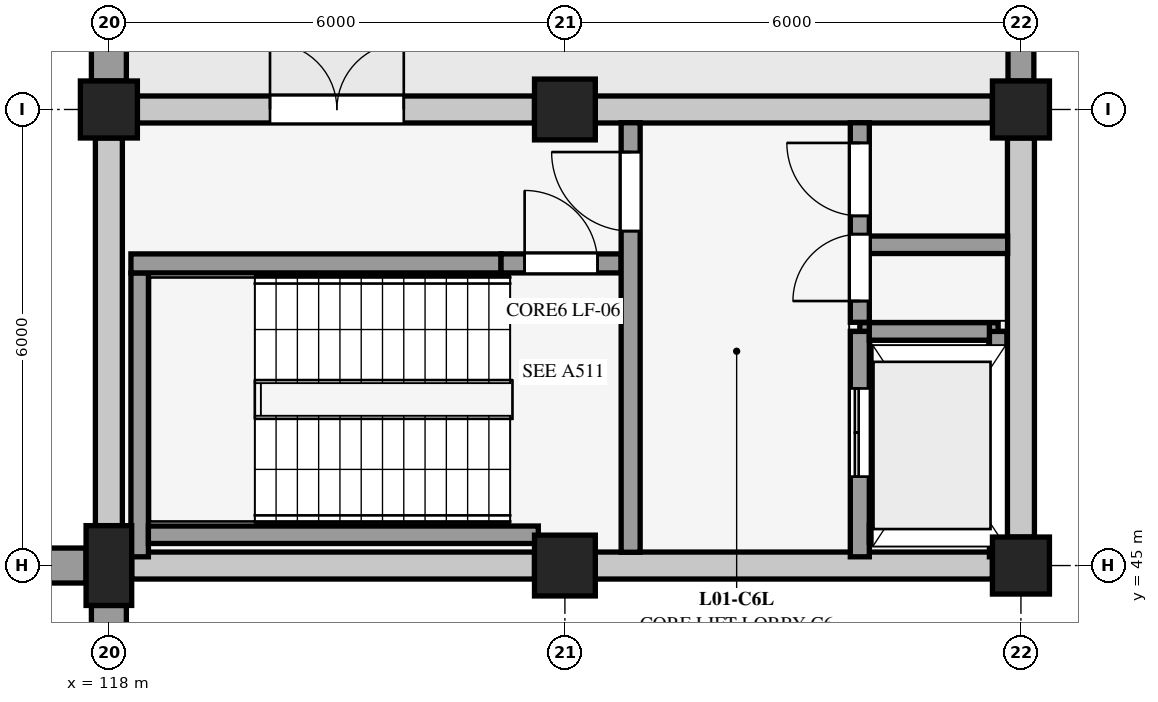
"""IFC4 building model, lengths in metres.
Left out: names, types, materials, properties, quantities, classifications, styles, units other than length and angle.
Written with IfcOpenShell. Run it as: python <this file> out.ifc"""

import sys

from ifc_helpers import new_model, si_unit, direction, frame, frame_2d, origin, origin_2d, place, context, subcontext, project, spatial, rectangle, extrude, element, fill, save


model = new_model("IFC4")
c1 = context("Model", 3, precision=1e-05, world=origin(), true_north=direction((0.0, 1.0)))
c2 = subcontext(c1, "Body", "Model", "MODEL_VIEW")
j1 = project(units=[si_unit("LENGTHUNIT", "METRE"), si_unit("PLANEANGLEUNIT", "RADIAN")], contexts=[c1])
p1 = place(None, origin())
s1 = spatial("IfcSite", under=j1, at=p1, CompositionType="ELEMENT")
p2 = place(p1, origin())
s2 = spatial("IfcBuilding", under=s1, at=p2, CompositionType="ELEMENT")
p3 = place(p2, origin())
s3 = spatial("IfcBuildingStorey", under=s2, at=p3, CompositionType="ELEMENT", Elevation=0.0)
p4 = place(p3, frame((118.0, 45.0, 0.0), z_axis=(0.0, 0.0, 1.0), x_axis=(1.0, 0.0, 0.0)))
e1 = element("IfcColumn", 1, at=p4, inside=s3, PredefinedType="PILASTER", context=c2, shape_type="SweptSolid", body=[
    extrude(rectangle(XDim=0.6, YDim=1.05, at=origin_2d()), origin(), (0.0, 0.0, 1.0), 4.5),
])
p5 = place(p3, frame((118.0, 51.0, 0.0), z_axis=(0.0, 0.0, 1.0), x_axis=(1.0, 0.0, 0.0)))
e2 = element("IfcColumn", 2, at=p5, inside=s3, PredefinedType="COLUMN", context=c2, shape_type="SweptSolid", body=[
    extrude(rectangle(XDim=0.75, YDim=0.75, at=origin_2d()), origin(), (0.0, 0.0, 1.0), 4.5),
])
for number, where, z_axis, x_axis in (
    (3, (124.0, 45.0, 0.0), (0.0, 0.0, 1.0), (1.0, 0.0, 0.0)),
    (4, (124.0, 51.0, 0.0), (0.0, 0.0, 1.0), (1.0, 0.0, 0.0)),
):
    element("IfcColumn", number, at=place(p3, frame(where, z_axis=z_axis, x_axis=x_axis)), inside=s3, PredefinedType="COLUMN", context=c2, shape_type="SweptSolid", body=[
        extrude(rectangle(XDim=0.8, YDim=0.8, at=origin_2d()), origin(), (0.0, 0.0, 1.0), 4.5),
    ])
for number, where, z_axis, x_axis in (
    (5, (130.0, 45.0, 0.0), (0.0, 0.0, 1.0), (1.0, 0.0, 0.0)),
    (6, (130.0, 51.0, 0.0), (0.0, 0.0, 1.0), (1.0, 0.0, 0.0)),
):
    element("IfcColumn", number, at=place(p3, frame(where, z_axis=z_axis, x_axis=x_axis)), inside=s3, PredefinedType="COLUMN", context=c2, shape_type="SweptSolid", body=[
        extrude(rectangle(XDim=0.75, YDim=0.75, at=origin_2d()), origin(), (0.0, 0.0, 1.0), 4.5),
    ])
p6 = place(p3, frame((112.3, 45.0, 0.0), z_axis=(0.0, 0.0, 1.0), x_axis=(1.0, 0.0, 0.0)))
e7 = element("IfcWall", 7, at=p6, inside=s3, PredefinedType="USERDEFINED", context=c2, shape_type="SweptSolid", body=[
    extrude(rectangle(XDim=5.4, YDim=0.46, at=frame_2d((2.7, 0.0))), origin(), (0.0, 0.0, 1.0), 4.5),
])
p7 = place(p3, frame((118.0, 51.375, 0.0), z_axis=(0.0, 0.0, 1.0), x_axis=(0.0, 1.0, 0.0)))
e8 = element("IfcWall", 8, at=p7, inside=s3, PredefinedType="USERDEFINED", context=c2, shape_type="SweptSolid", body=[
    extrude(rectangle(XDim=4.6, YDim=0.46, at=frame_2d((2.3, 0.0))), origin(), (0.0, 0.0, 1.0), 4.5),
])
p8 = place(p3, frame((118.0, 39.4, 0.0), z_axis=(0.0, 0.0, 1.0), x_axis=(0.0, 1.0, 0.0)))
e9 = element("IfcWall", 9, at=p8, inside=s3, PredefinedType="USERDEFINED", context=c2, shape_type="SweptSolid", body=[
    extrude(rectangle(XDim=5.075, YDim=0.46, at=frame_2d((2.538, 0.0))), origin(), (0.0, 0.0, 1.0), 4.5),
])
p9 = place(p3, frame((130.0, 51.375, 0.0), z_axis=(0.0, 0.0, 1.0), x_axis=(0.0, 1.0, 0.0)))
e10 = element("IfcWall", 10, at=p9, inside=s3, PredefinedType="USERDEFINED", context=c2, shape_type="SweptSolid", body=[
    extrude(rectangle(XDim=4.75, YDim=0.34, at=frame_2d((2.375, 0.0))), origin(), (0.0, 0.0, 1.0), 4.5),
])
p10 = place(p3, frame((123.6, 45.0, 0.0), z_axis=(0.0, 0.0, 1.0), x_axis=(-1.0, 0.0, 0.0)))
e11 = element("IfcWall", 11, at=p10, inside=s3, PredefinedType="SOLIDWALL", context=c2, shape_type="SweptSolid", body=[
    extrude(rectangle(XDim=5.3, YDim=0.355, at=frame_2d((2.65, 0.0))), origin(), (0.0, 0.0, 1.0), 3.747),
])
p11 = place(p3, frame((118.375, 51.0, 0.0), z_axis=(0.0, 0.0, 1.0), x_axis=(1.0, 0.0, 0.0)))
e12 = element("IfcWall", 12, at=p11, inside=s3, PredefinedType="SOLIDWALL", context=c2, shape_type="SweptSolid", body=[
    extrude(rectangle(XDim=5.225, YDim=0.355, at=frame_2d((2.613, 0.0))), origin(), (0.0, 0.0, 1.0), 3.881),
])
p12 = place(p11, frame((1.745, 0.0, 0.0)))
e13 = element("IfcOpeningElement", 13, at=p12, cuts=e12, PredefinedType="OPENING", context=c2, shape_type="SweptSolid", body=[
    extrude(rectangle(XDim=1.76, YDim=2.18, at=frame_2d((0.88, 1.09))), frame((0.0, 0.188, 0.0), z_axis=(0.0, -1.0, 0.0), x_axis=(1.0, 0.0, 0.0)), (0.0, 0.0, 1.0), 0.375),
])
p13 = place(p3, frame((129.625, 45.0, 0.0), z_axis=(0.0, 0.0, 1.0), x_axis=(-1.0, 0.0, 0.0)))
e14 = element("IfcWall", 14, at=p13, inside=s3, PredefinedType="SOLIDWALL", context=c2, shape_type="SweptSolid", body=[
    extrude(rectangle(XDim=5.225, YDim=0.355, at=frame_2d((2.613, 0.0))), origin(), (0.0, 0.0, 1.0), 3.671),
])
p14 = place(p3, frame((124.4, 51.0, 0.0), z_axis=(0.0, 0.0, 1.0), x_axis=(1.0, 0.0, 0.0)))
e15 = element("IfcWall", 15, at=p14, inside=s3, PredefinedType="SOLIDWALL", context=c2, shape_type="SweptSolid", body=[
    extrude(rectangle(XDim=5.225, YDim=0.355, at=frame_2d((2.613, 0.0))), origin(), (0.0, 0.0, 1.0), 3.881),
])
p15 = place(p3, frame((118.0, 45.525, 0.0), z_axis=(0.0, 0.0, 1.0), x_axis=(0.0, 1.0, 0.0)))
e16 = element("IfcWall", 16, at=p15, inside=s3, PredefinedType="SOLIDWALL", context=c2, shape_type="SweptSolid", body=[
    extrude(rectangle(XDim=5.1, YDim=0.355, at=frame_2d((2.55, 0.0))), origin(), (0.0, 0.0, 1.0), 3.56),
])
p16 = place(p3, frame((130.0, 50.625, 0.0), z_axis=(0.0, 0.0, 1.0), x_axis=(0.0, -1.0, 0.0)))
e17 = element("IfcWall", 17, at=p16, inside=s3, PredefinedType="SOLIDWALL", context=c2, shape_type="SweptSolid", body=[
    extrude(rectangle(XDim=5.25, YDim=0.355, at=frame_2d((2.625, 0.0))), origin(), (0.0, 0.0, 1.0), 3.856),
])
p17 = place(p3, frame((127.88, 45.42, -1.05), z_axis=(0.0, 0.0, 1.0), x_axis=(1.0, 0.0, 0.0)))
e18 = element("IfcWall", 18, at=p17, inside=s3, PredefinedType="SHEAR", context=c2, shape_type="SweptSolid", body=[
    extrude(rectangle(XDim=1.82, YDim=0.23, at=frame_2d((0.91, 0.0))), origin(), (0.0, 0.0, 1.0), 1.05),
])
p18 = place(p3, frame((129.7, 45.42, -1.05), z_axis=(0.0, 0.0, 1.0), x_axis=(0.0, 1.0, 0.0)))
e19 = element("IfcWall", 19, at=p18, inside=s3, PredefinedType="SHEAR", context=c2, shape_type="SweptSolid", body=[
    extrude(rectangle(XDim=2.66, YDim=0.23, at=frame_2d((1.33, 0.0))), origin(), (0.0, 0.0, 1.0), 1.05),
])
p19 = place(p3, frame((129.7, 48.08, -1.05), z_axis=(0.0, 0.0, 1.0), x_axis=(-1.0, 0.0, 0.0)))
e20 = element("IfcWall", 20, at=p19, inside=s3, PredefinedType="SHEAR", context=c2, shape_type="SweptSolid", body=[
    extrude(rectangle(XDim=1.82, YDim=0.23, at=frame_2d((0.91, 0.0))), origin(), (0.0, 0.0, 1.0), 1.05),
])
p20 = place(p3, frame((127.88, 48.08, -1.05), z_axis=(0.0, 0.0, 1.0), x_axis=(0.0, -1.0, 0.0)))
e21 = element("IfcWall", 21, at=p20, inside=s3, PredefinedType="SHEAR", context=c2, shape_type="SweptSolid", body=[
    extrude(rectangle(XDim=2.66, YDim=0.23, at=frame_2d((1.33, 0.0))), origin(), (0.0, 0.0, 1.0), 1.05),
])
p21 = place(p3, frame((118.405, 45.115, 0.0), z_axis=(0.0, 0.0, 1.0), x_axis=(0.0, 1.0, 0.0)))
e22 = element("IfcWall", 22, at=p21, inside=s3, PredefinedType="SHEAR", context=c2, shape_type="SweptSolid", body=[
    extrude(rectangle(XDim=3.735, YDim=0.23, at=frame_2d((1.868, 0.0))), origin(), (0.0, 0.0, 1.0), 4.5),
])
p22 = place(p3, frame((118.52, 45.405, 0.0), z_axis=(0.0, 0.0, 1.0), x_axis=(1.0, 0.0, 0.0)))
e23 = element("IfcWall", 23, at=p22, inside=s3, PredefinedType="SHEAR", context=c2, shape_type="SweptSolid", body=[
    extrude(rectangle(XDim=5.13, YDim=0.23, at=frame_2d((2.565, 0.0))), origin(), (0.0, 0.0, 1.0), 4.5),
])
p23 = place(p3, frame((118.29, 48.975, 0.0), z_axis=(0.0, 0.0, 1.0), x_axis=(1.0, 0.0, 0.0)))
e24 = element("IfcWall", 24, at=p23, inside=s3, PredefinedType="SHEAR", context=c2, shape_type="SweptSolid", body=[
    extrude(rectangle(XDim=4.87, YDim=0.25, at=frame_2d((2.435, 0.0))), origin(), (0.0, 0.0, 1.0), 4.5),
])
p24 = place(p3, frame((123.16, 48.975, 0.0), z_axis=(0.0, 0.0, 1.0), x_axis=(1.0, 0.0, 0.0)))
e25 = element("IfcWall", 25, at=p24, inside=s3, PredefinedType="SHEAR", context=c2, shape_type="SweptSolid", body=[
    extrude(rectangle(XDim=1.58, YDim=0.25, at=frame_2d((0.79, 0.0))), origin(), (0.0, 0.0, 1.0), 4.288),
])
p25 = place(p24, frame((0.31, 0.0, 0.0)))
e26 = element("IfcOpeningElement", 26, at=p25, cuts=e25, PredefinedType="OPENING", context=c2, shape_type="SweptSolid", body=[
    extrude(rectangle(XDim=0.96, YDim=2.12, at=frame_2d((0.48, 1.06))), frame((0.0, 0.135, 0.0), z_axis=(0.0, -1.0, 0.0), x_axis=(1.0, 0.0, 0.0)), (0.0, 0.0, 1.0), 0.27),
])
p26 = place(p3, frame((124.865, 45.175, 0.0), z_axis=(0.0, 0.0, 1.0), x_axis=(0.0, 1.0, 0.0)))
e27 = element("IfcWall", 27, at=p26, inside=s3, PredefinedType="SHEAR", context=c2, shape_type="SweptSolid", body=[
    extrude(rectangle(XDim=5.65, YDim=0.25, at=frame_2d((2.825, 0.0))), origin(), (0.0, 0.0, 1.0), 4.288),
])
p27 = place(p26, frame((4.225, 0.0, 0.0)))
e28 = element("IfcOpeningElement", 28, at=p27, cuts=e27, PredefinedType="OPENING", context=c2, shape_type="SweptSolid", body=[
    extrude(rectangle(XDim=1.04, YDim=2.14, at=frame_2d((0.52, 1.07))), frame((0.0, 0.135, 0.0), z_axis=(0.0, -1.0, 0.0), x_axis=(1.0, 0.0, 0.0)), (0.0, 0.0, 1.0), 0.27),
])
p28 = place(p3, frame((127.88, 45.115, 0.0), z_axis=(0.0, 0.0, 1.0), x_axis=(0.0, 1.0, 0.0)))
e29 = element("IfcWall", 29, at=p28, inside=s3, PredefinedType="SHEAR", context=c2, shape_type="SweptSolid", body=[
    extrude(rectangle(XDim=2.965, YDim=0.25, at=frame_2d((1.482, 0.0))), origin(), (0.0, 0.0, 1.0), 4.5),
])
p29 = place(p28, frame((1.055, 0.0, 0.0)))
e30 = element("IfcOpeningElement", 30, at=p29, cuts=e29, PredefinedType="OPENING", context=c2, shape_type="SweptSolid", body=[
    extrude(rectangle(XDim=1.16, YDim=2.18, at=frame_2d((0.58, 1.09))), frame((0.0, 0.135, 0.0), z_axis=(0.0, -1.0, 0.0), x_axis=(1.0, 0.0, 0.0)), (0.0, 0.0, 1.0), 0.27),
])
p30 = place(p3, frame((128.005, 45.42, 0.0), z_axis=(0.0, 0.0, 1.0), x_axis=(1.0, 0.0, 0.0)))
e31 = element("IfcWall", 31, at=p30, inside=s3, PredefinedType="SHEAR", context=c2, shape_type="SweptSolid", body=[
    extrude(rectangle(XDim=1.58, YDim=0.23, at=frame_2d((0.79, 0.0))), origin(), (0.0, 0.0, 1.0), 4.5),
])
p31 = place(p3, frame((129.7, 45.115, 0.0), z_axis=(0.0, 0.0, 1.0), x_axis=(0.0, 1.0, 0.0)))
e32 = element("IfcWall", 32, at=p31, inside=s3, PredefinedType="SHEAR", context=c2, shape_type="SweptSolid", body=[
    extrude(rectangle(XDim=2.965, YDim=0.23, at=frame_2d((1.482, 0.0))), origin(), (0.0, 0.0, 1.0), 4.5),
])
p32 = place(p3, frame((128.005, 48.08, 0.0), z_axis=(0.0, 0.0, 1.0), x_axis=(1.0, 0.0, 0.0)))
e33 = element("IfcWall", 33, at=p32, inside=s3, PredefinedType="SHEAR", context=c2, shape_type="SweptSolid", body=[
    extrude(rectangle(XDim=1.58, YDim=0.23, at=frame_2d((0.79, 0.0))), origin(), (0.0, 0.0, 1.0), 4.5),
])
p33 = place(p3, frame((127.88, 48.2, 0.0), z_axis=(0.0, 0.0, 1.0), x_axis=(0.0, 1.0, 0.0)))
e34 = element("IfcWall", 34, at=p33, inside=s3, PredefinedType="SHEAR", context=c2, shape_type="SweptSolid", body=[
    extrude(rectangle(XDim=2.625, YDim=0.25, at=frame_2d((1.312, 0.0))), origin(), (0.0, 0.0, 1.0), 4.288),
])
p34 = place(p33, frame((0.28, 0.0, 0.0)))
e35 = element("IfcOpeningElement", 35, at=p34, cuts=e34, PredefinedType="OPENING", context=c2, shape_type="SweptSolid", body=[
    extrude(rectangle(XDim=0.88, YDim=2.08, at=frame_2d((0.44, 1.04))), frame((0.0, 0.135, 0.0), z_axis=(0.0, -1.0, 0.0), x_axis=(1.0, 0.0, 0.0)), (0.0, 0.0, 1.0), 0.27),
])
p35 = place(p33, frame((1.4, 0.0, 0.0)))
e36 = element("IfcOpeningElement", 36, at=p35, cuts=e34, PredefinedType="OPENING", context=c2, shape_type="SweptSolid", body=[
    extrude(rectangle(XDim=0.96, YDim=2.12, at=frame_2d((0.48, 1.06))), frame((0.0, 0.135, 0.0), z_axis=(0.0, -1.0, 0.0), x_axis=(1.0, 0.0, 0.0)), (0.0, 0.0, 1.0), 0.27),
])
p36 = place(p3, frame((128.005, 49.22, 0.0), z_axis=(0.0, 0.0, 1.0), x_axis=(1.0, 0.0, 0.0)))
e37 = element("IfcWall", 37, at=p36, inside=s3, PredefinedType="SHEAR", context=c2, shape_type="SweptSolid", body=[
    extrude(rectangle(XDim=1.82, YDim=0.23, at=frame_2d((0.91, 0.0))), origin(), (0.0, 0.0, 1.0), 4.288),
])
p37 = place(p12, origin())
e38 = element("IfcDoor", 38, at=p37, inside=s3, OperationType="DOUBLE_DOOR_SINGLE_SWING", PredefinedType="DOOR", context=c2, shape_type="SweptSolid", body=[
    extrude(rectangle(XDim=1.76, YDim=2.18, at=frame_2d((0.88, 1.09))), frame((0.0, 0.025, 0.0), z_axis=(0.0, -1.0, 0.0), x_axis=(1.0, 0.0, 0.0)), (0.0, 0.0, 1.0), 0.05),
])
fill(e13, e38)
p38 = place(p25, origin())
e39 = element("IfcDoor", 39, at=p38, inside=s3, OperationType="SINGLE_SWING_LEFT", PredefinedType="DOOR", context=c2, shape_type="SweptSolid", body=[
    extrude(rectangle(XDim=0.96, YDim=2.12, at=frame_2d((0.48, 1.06))), frame((0.0, 0.025, 0.0), z_axis=(0.0, -1.0, 0.0), x_axis=(1.0, 0.0, 0.0)), (0.0, 0.0, 1.0), 0.05),
])
fill(e26, e39)
p39 = place(p27, origin())
e40 = element("IfcDoor", 40, at=p39, inside=s3, OperationType="SINGLE_SWING_RIGHT", PredefinedType="DOOR", context=c2, shape_type="SweptSolid", body=[
    extrude(rectangle(XDim=1.04, YDim=2.14, at=frame_2d((0.52, 1.07))), frame((0.0, 0.025, 0.0), z_axis=(0.0, -1.0, 0.0), x_axis=(1.0, 0.0, 0.0)), (0.0, 0.0, 1.0), 0.05),
])
fill(e28, e40)
p40 = place(p29, origin())
e41 = element("IfcDoor", 41, at=p40, inside=s3, OperationType="DOUBLE_DOOR_SLIDING", PredefinedType="DOOR", context=c2, shape_type="SweptSolid", body=[
    extrude(rectangle(XDim=1.16, YDim=2.18, at=frame_2d((0.58, 1.09))), frame((0.0, 0.025, 0.0), z_axis=(0.0, -1.0, 0.0), x_axis=(1.0, 0.0, 0.0)), (0.0, 0.0, 1.0), 0.05),
])
fill(e30, e41)
p41 = place(p34, origin())
e42 = element("IfcDoor", 42, at=p41, inside=s3, OperationType="SINGLE_SWING_LEFT", PredefinedType="DOOR", context=c2, shape_type="SweptSolid", body=[
    extrude(rectangle(XDim=0.88, YDim=2.08, at=frame_2d((0.44, 1.04))), frame((0.0, 0.025, 0.0), z_axis=(0.0, -1.0, 0.0), x_axis=(1.0, 0.0, 0.0)), (0.0, 0.0, 1.0), 0.05),
])
fill(e35, e42)
p42 = place(p35, origin())
e43 = element("IfcDoor", 43, at=p42, inside=s3, OperationType="SINGLE_SWING_RIGHT", PredefinedType="DOOR", context=c2, shape_type="SweptSolid", body=[
    extrude(rectangle(XDim=0.96, YDim=2.12, at=frame_2d((0.48, 1.06))), frame((0.0, 0.025, 0.0), z_axis=(0.0, -1.0, 0.0), x_axis=(1.0, 0.0, 0.0)), (0.0, 0.0, 1.0), 0.05),
])
fill(e36, e43)
save(model, sys.argv[1])
